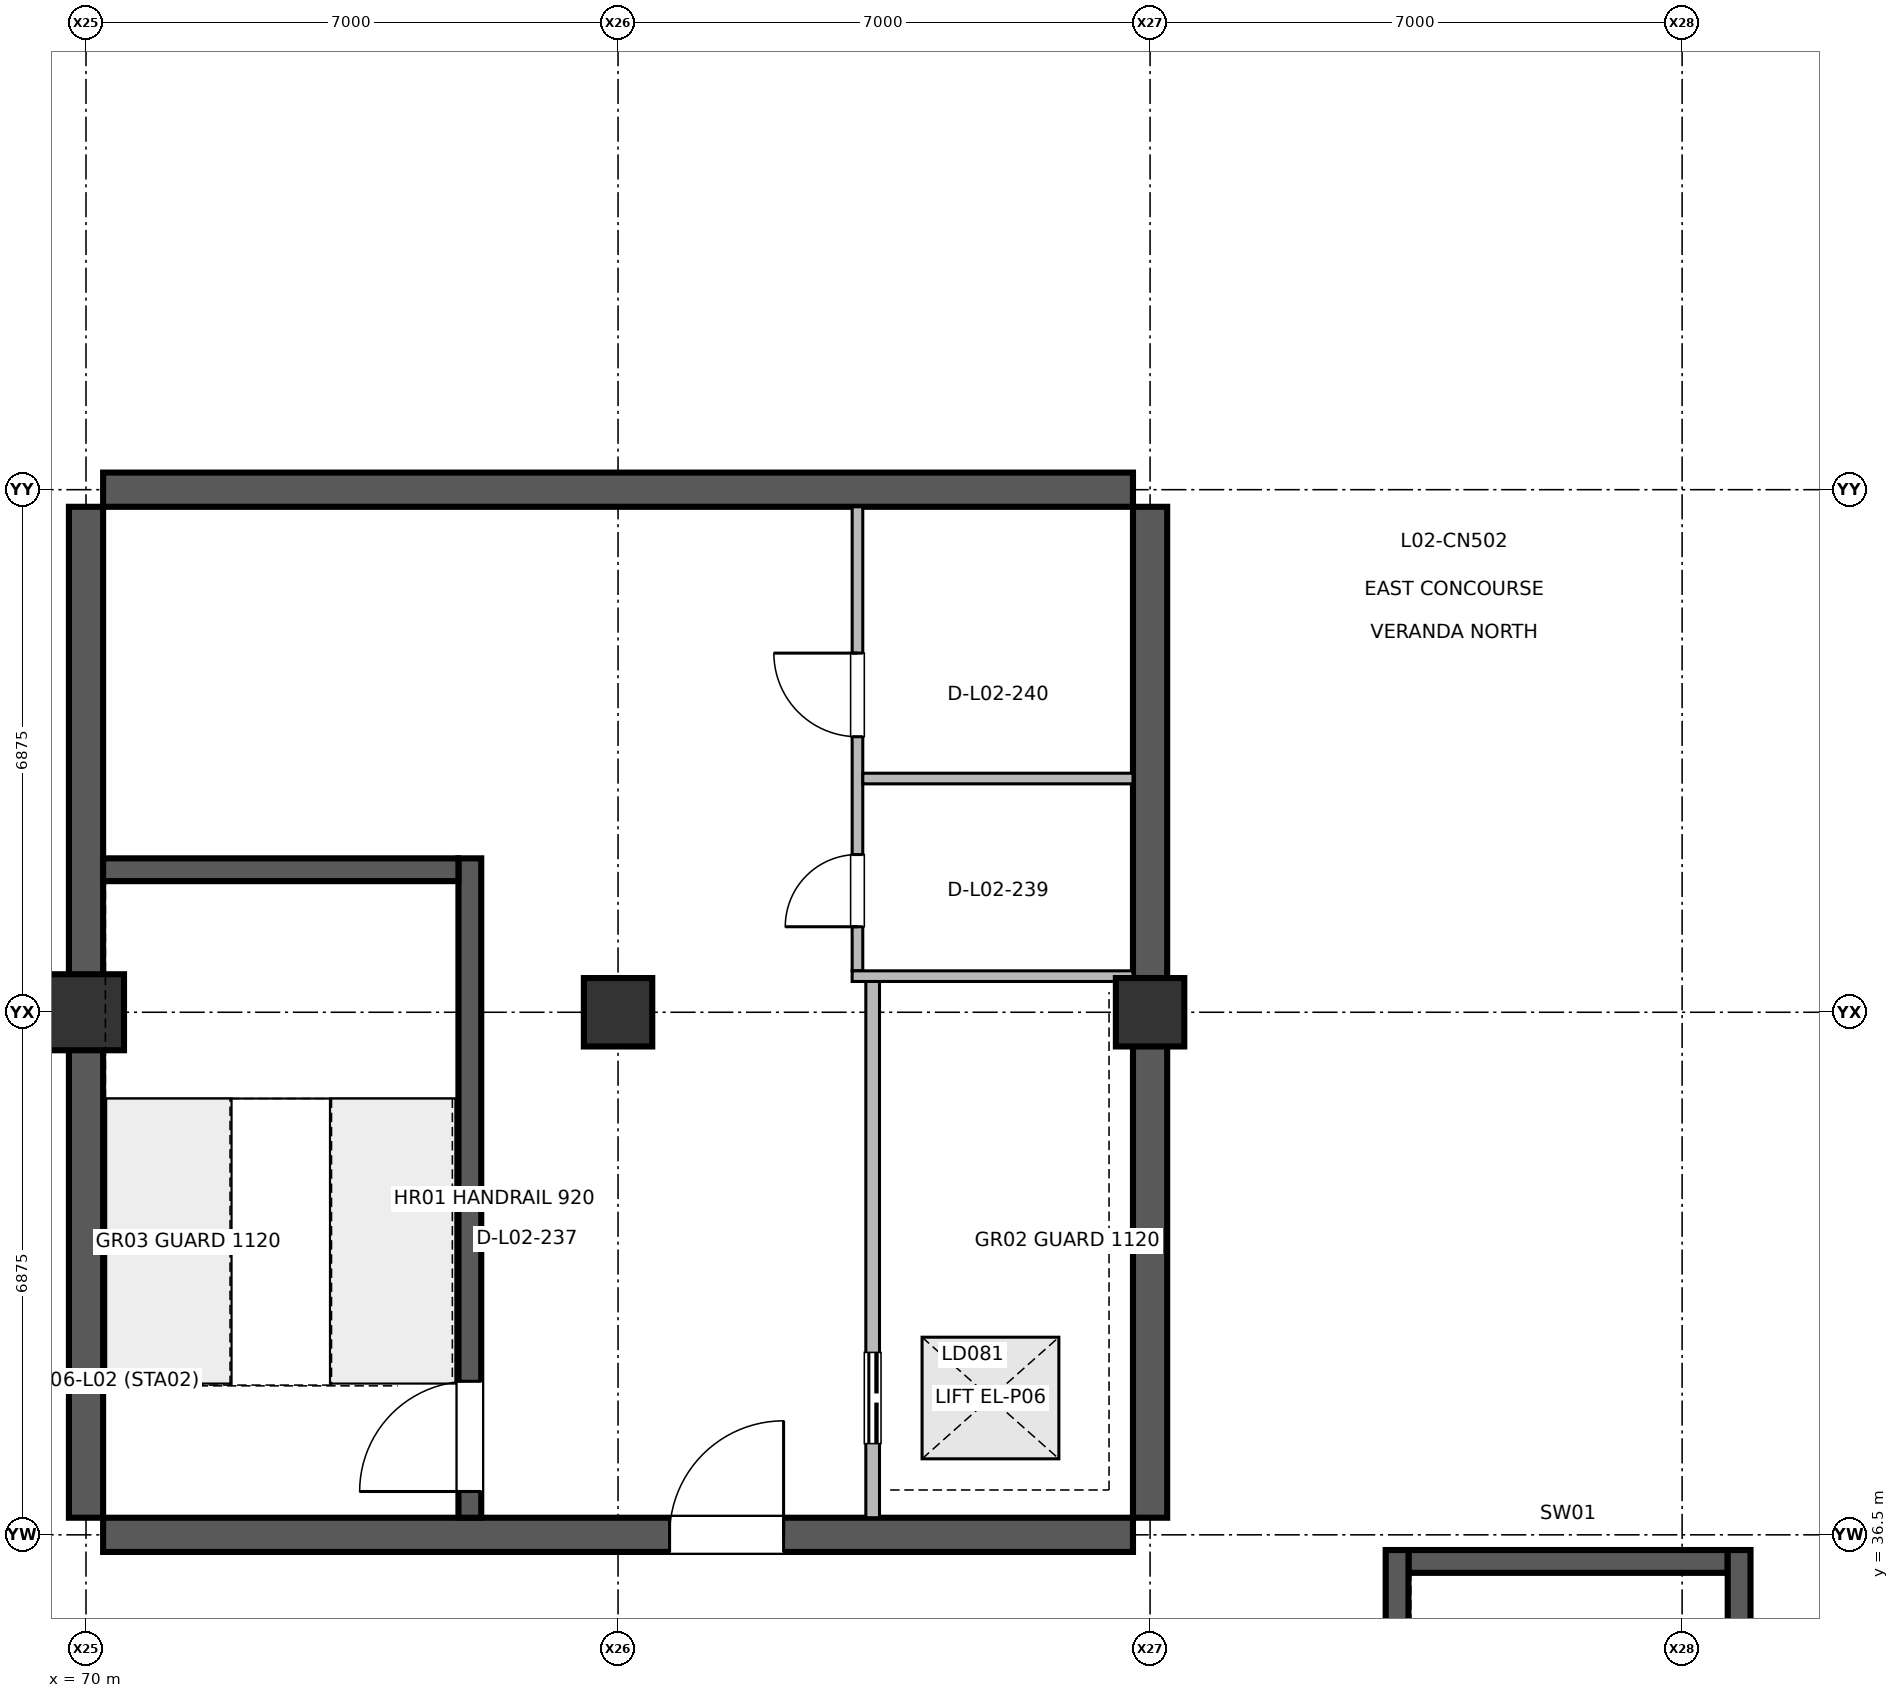
"""IFC4 building model, lengths in metres.
Left out: names, types, materials, properties, quantities, classifications, styles, units other than length and angle.
Written with IfcOpenShell. Run it as: python <this file> out.ifc"""

import sys

from ifc_helpers import new_model, si_unit, direction, frame, frame_2d, origin, origin_2d, place, context, subcontext, project, spatial, rectangle, extrude, element, fill, save


model = new_model("IFC4")
c1 = context("Model", 3, precision=1e-05, world=origin(), true_north=direction((0.0, 1.0)))
c2 = subcontext(c1, "Body", "Model", "MODEL_VIEW")
j1 = project(units=[si_unit("LENGTHUNIT", "METRE"), si_unit("PLANEANGLEUNIT", "RADIAN")], contexts=[c1])
p1 = place(None, origin())
s1 = spatial("IfcSite", under=j1, at=p1, CompositionType="ELEMENT")
p2 = place(p1, origin())
s2 = spatial("IfcBuilding", under=s1, at=p2, CompositionType="ELEMENT")
p3 = place(p2, frame((0.0, 0.0, 6.0)))
s3 = spatial("IfcBuildingStorey", under=s2, at=p3, CompositionType="ELEMENT", Elevation=6.0)
p4 = place(p3, frame((70.0, 43.375, 0.0), z_axis=(0.0, 0.0, 1.0), x_axis=(1.0, 0.0, 0.0)))
e1 = element("IfcColumn", 1, at=p4, inside=s3, PredefinedType="COLUMN", context=c2, shape_type="SweptSolid", body=[
    extrude(rectangle(XDim=1.0, YDim=1.0, at=origin_2d()), origin(), (0.0, 0.0, 1.0), 5.398),
])
for number, where, z_axis, x_axis in (
    (2, (77.0, 43.375, 0.0), (0.0, 0.0, 1.0), (1.0, 0.0, 0.0)),
    (3, (84.0, 43.375, 0.0), (0.0, 0.0, 1.0), (1.0, 0.0, 0.0)),
):
    element("IfcColumn", number, at=place(p3, frame(where, z_axis=z_axis, x_axis=x_axis)), inside=s3, PredefinedType="COLUMN", context=c2, shape_type="SweptSolid", body=[
        extrude(rectangle(XDim=0.9, YDim=0.9, at=origin_2d()), origin(), (0.0, 0.0, 1.0), 5.398),
    ])
for number, where, z_axis, x_axis in (
    (4, (70.0, 36.725, 0.0), (0.0, 0.0, 1.0), (0.0, 1.0, 0.0)),
    (5, (84.0, 36.725, 0.0), (0.0, 0.0, 1.0), (0.0, 1.0, 0.0)),
):
    element("IfcWall", number, at=place(p3, frame(where, z_axis=z_axis, x_axis=x_axis)), inside=s3, PredefinedType="SHEAR", context=c2, shape_type="SweptSolid", body=[
        extrude(rectangle(XDim=13.3, YDim=0.45, at=frame_2d((6.65, 0.0))), origin(), (0.0, 0.0, 1.0), 5.15),
    ])
p5 = place(p3, frame((70.225, 36.5, 0.0), z_axis=(0.0, 0.0, 1.0), x_axis=(1.0, 0.0, 0.0)))
e6 = element("IfcWall", 6, at=p5, inside=s3, PredefinedType="SHEAR", context=c2, shape_type="SweptSolid", body=[
    extrude(rectangle(XDim=13.55, YDim=0.45, at=frame_2d((6.775, 0.0))), origin(), (0.0, 0.0, 1.0), 5.15),
])
p6 = place(p5, frame((7.453, 0.0, 0.0)))
e7 = element("IfcOpeningElement", 7, at=p6, cuts=e6, PredefinedType="OPENING", context=c2, shape_type="SweptSolid", body=[
    extrude(rectangle(XDim=1.5, YDim=2.2, at=frame_2d((0.75, 1.1))), frame((0.0, 0.235, 0.0), z_axis=(0.0, -1.0, 0.0), x_axis=(1.0, 0.0, 0.0)), (0.0, 0.0, 1.0), 0.47),
])
p7 = place(p3, frame((70.225, 50.25, 0.0), z_axis=(0.0, 0.0, 1.0), x_axis=(1.0, 0.0, 0.0)))
e8 = element("IfcWall", 8, at=p7, inside=s3, PredefinedType="SHEAR", context=c2, shape_type="SweptSolid", body=[
    extrude(rectangle(XDim=13.55, YDim=0.45, at=frame_2d((6.775, 0.0))), origin(), (0.0, 0.0, 1.0), 5.15),
])
p8 = place(p3, frame((75.05, 36.725, 0.0), z_axis=(0.0, 0.0, 1.0), x_axis=(0.0, 1.0, 0.0)))
e9 = element("IfcWall", 9, at=p8, inside=s3, PredefinedType="SHEAR", context=c2, shape_type="SweptSolid", body=[
    extrude(rectangle(XDim=8.675, YDim=0.3, at=frame_2d((4.337, 0.0))), origin(), (0.0, 0.0, 1.0), 5.15),
])
p9 = place(p8, frame((0.345, 0.0, 0.0)))
e10 = element("IfcOpeningElement", 10, at=p9, cuts=e9, PredefinedType="OPENING", context=c2, shape_type="SweptSolid", body=[
    extrude(rectangle(XDim=1.45, YDim=2.2, at=frame_2d((0.725, 1.1))), frame((0.0, 0.16, 0.0), z_axis=(0.0, -1.0, 0.0), x_axis=(1.0, 0.0, 0.0)), (0.0, 0.0, 1.0), 0.32),
])
p10 = place(p3, frame((80.35, 36.725, 0.0), z_axis=(0.0, 0.0, 1.0), x_axis=(0.0, 1.0, 0.0)))
e11 = element("IfcWall", 11, at=p10, inside=s3, PredefinedType="PARTITIONING", context=c2, shape_type="SweptSolid", body=[
    extrude(rectangle(XDim=7.055, YDim=0.18, at=frame_2d((3.527, 0.0))), origin(), (0.0, 0.0, 1.0), 4.375),
])
p11 = place(p10, frame((0.975, 0.0, 0.0)))
e12 = element("IfcOpeningElement", 12, at=p11, cuts=e11, PredefinedType="OPENING", context=c2, shape_type="SweptSolid", body=[
    extrude(rectangle(XDim=1.2, YDim=2.25, at=frame_2d((0.6, 1.125))), frame((0.0, 0.1, 0.0), z_axis=(0.0, -1.0, 0.0), x_axis=(1.0, 0.0, 0.0)), (0.0, 0.0, 1.0), 0.2),
])
p12 = place(p3, frame((80.15, 43.92, 0.0), z_axis=(0.0, 0.0, 1.0), x_axis=(0.0, 1.0, 0.0)))
e13 = element("IfcWall", 13, at=p12, inside=s3, PredefinedType="PARTITIONING", context=c2, shape_type="SweptSolid", body=[
    extrude(rectangle(XDim=6.105, YDim=0.14, at=frame_2d((3.052, 0.0))), origin(), (0.0, 0.0, 1.0), 4.42),
])
p13 = place(p12, frame((0.58, 0.0, 0.0)))
e14 = element("IfcOpeningElement", 14, at=p13, cuts=e13, PredefinedType="OPENING", context=c2, shape_type="SweptSolid", body=[
    extrude(rectangle(XDim=0.95, YDim=2.15, at=frame_2d((0.475, 1.075))), frame((0.0, 0.08, 0.0), z_axis=(0.0, -1.0, 0.0), x_axis=(1.0, 0.0, 0.0)), (0.0, 0.0, 1.0), 0.16),
])
p14 = place(p12, frame((3.08, 0.0, 0.0)))
e15 = element("IfcOpeningElement", 15, at=p14, cuts=e13, PredefinedType="OPENING", context=c2, shape_type="SweptSolid", body=[
    extrude(rectangle(XDim=1.1, YDim=2.15, at=frame_2d((0.55, 1.075))), frame((0.0, 0.08, 0.0), z_axis=(0.0, -1.0, 0.0), x_axis=(1.0, 0.0, 0.0)), (0.0, 0.0, 1.0), 0.16),
])
p15 = place(p3, frame((80.08, 43.85, 0.0), z_axis=(0.0, 0.0, 1.0), x_axis=(1.0, 0.0, 0.0)))
e16 = element("IfcWall", 16, at=p15, inside=s3, PredefinedType="PARTITIONING", context=c2, shape_type="SweptSolid", body=[
    extrude(rectangle(XDim=3.695, YDim=0.14, at=frame_2d((1.847, 0.0))), origin(), (0.0, 0.0, 1.0), 4.42),
])
p16 = place(p3, frame((80.22, 46.45, 0.0), z_axis=(0.0, 0.0, 1.0), x_axis=(1.0, 0.0, 0.0)))
e17 = element("IfcWall", 17, at=p16, inside=s3, PredefinedType="PARTITIONING", context=c2, shape_type="SweptSolid", body=[
    extrude(rectangle(XDim=3.555, YDim=0.14, at=frame_2d((1.777, 0.0))), origin(), (0.0, 0.0, 1.0), 4.42),
])
p17 = place(p3, frame((70.225, 45.25, 0.0), z_axis=(0.0, 0.0, 1.0), x_axis=(1.0, 0.0, 0.0)))
e18 = element("IfcWall", 18, at=p17, inside=s3, PredefinedType="SHEAR", context=c2, shape_type="SweptSolid", body=[
    extrude(rectangle(XDim=4.675, YDim=0.3, at=frame_2d((2.337, 0.0))), origin(), (0.0, 0.0, 1.0), 5.15),
])
p18 = place(p3, frame((87.4, 36.15, 0.0), z_axis=(0.0, 0.0, 1.0), x_axis=(1.0, 0.0, 0.0)))
e19 = element("IfcWall", 19, at=p18, inside=s3, PredefinedType="SHEAR", context=c2, shape_type="SweptSolid", body=[
    extrude(rectangle(XDim=4.2, YDim=0.3, at=frame_2d((2.1, 0.0))), origin(), (0.0, 0.0, 1.0), 5.15),
])
for number, where, z_axis, x_axis in (
    (20, (87.25, 27.85, 0.0), (0.0, 0.0, 1.0), (0.0, 1.0, 0.0)),
    (21, (91.75, 27.85, 0.0), (0.0, 0.0, 1.0), (0.0, 1.0, 0.0)),
):
    element("IfcWall", number, at=place(p3, frame(where, z_axis=z_axis, x_axis=x_axis)), inside=s3, PredefinedType="SHEAR", context=c2, shape_type="SweptSolid", body=[
        extrude(rectangle(XDim=8.45, YDim=0.3, at=frame_2d((4.225, 0.0))), origin(), (0.0, 0.0, 1.0), 5.15),
    ])
p19 = place(p6, origin())
e22 = element("IfcDoor", 22, at=p19, inside=s3, OperationType="SINGLE_SWING_RIGHT", PredefinedType="DOOR", context=c2, shape_type="SweptSolid", body=[
    extrude(rectangle(XDim=1.5, YDim=2.2, at=frame_2d((0.75, 1.1))), frame((0.0, 0.025, 0.0), z_axis=(0.0, -1.0, 0.0), x_axis=(1.0, 0.0, 0.0)), (0.0, 0.0, 1.0), 0.05),
])
fill(e7, e22)
p20 = place(p9, origin())
e23 = element("IfcDoor", 23, at=p20, inside=s3, OperationType="SINGLE_SWING_LEFT", PredefinedType="DOOR", context=c2, shape_type="SweptSolid", body=[
    extrude(rectangle(XDim=1.45, YDim=2.2, at=frame_2d((0.725, 1.1))), frame((0.0, 0.025, 0.0), z_axis=(0.0, -1.0, 0.0), x_axis=(1.0, 0.0, 0.0)), (0.0, 0.0, 1.0), 0.05),
])
fill(e10, e23)
p21 = place(p11, origin())
e24 = element("IfcDoor", 24, at=p21, inside=s3, OperationType="DOUBLE_DOOR_SLIDING", PredefinedType="DOOR", context=c2, shape_type="SweptSolid", body=[
    extrude(rectangle(XDim=1.2, YDim=2.25, at=frame_2d((0.6, 1.125))), frame((0.0, 0.025, 0.0), z_axis=(0.0, -1.0, 0.0), x_axis=(1.0, 0.0, 0.0)), (0.0, 0.0, 1.0), 0.05),
])
fill(e12, e24)
p22 = place(p13, origin())
e25 = element("IfcDoor", 25, at=p22, inside=s3, OperationType="SINGLE_SWING_LEFT", PredefinedType="DOOR", context=c2, shape_type="SweptSolid", body=[
    extrude(rectangle(XDim=0.95, YDim=2.15, at=frame_2d((0.475, 1.075))), frame((0.0, 0.025, 0.0), z_axis=(0.0, -1.0, 0.0), x_axis=(1.0, 0.0, 0.0)), (0.0, 0.0, 1.0), 0.05),
])
fill(e14, e25)
p23 = place(p14, origin())
e26 = element("IfcDoor", 26, at=p23, inside=s3, OperationType="SINGLE_SWING_RIGHT", PredefinedType="DOOR", context=c2, shape_type="SweptSolid", body=[
    extrude(rectangle(XDim=1.1, YDim=2.15, at=frame_2d((0.55, 1.075))), frame((0.0, 0.025, 0.0), z_axis=(0.0, -1.0, 0.0), x_axis=(1.0, 0.0, 0.0)), (0.0, 0.0, 1.0), 0.05),
])
fill(e15, e26)
save(model, sys.argv[1])
